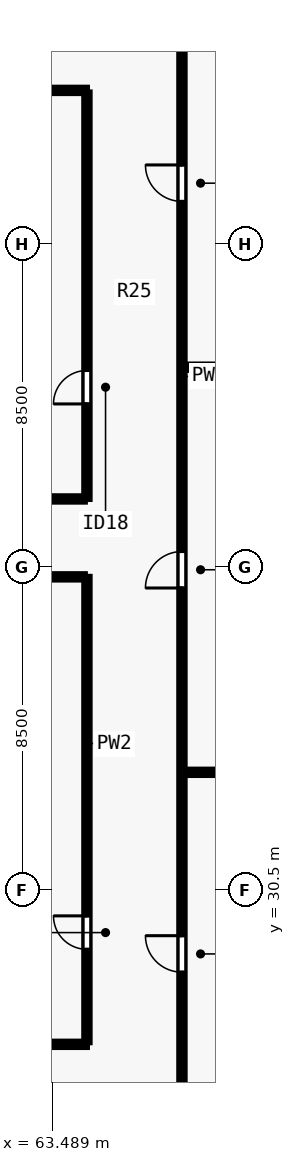
"""IFC4 building model, lengths in metres.
Left out: names, types, materials, properties, quantities, classifications, styles, units other than length and angle.
Written with IfcOpenShell. Run it as: python <this file> out.ifc"""

import sys

from ifc_helpers import new_model, si_unit, direction, frame, frame_2d, origin, place, context, subcontext, project, spatial, rectangle, extrude, element, fill, save


model = new_model("IFC4")
c1 = context("Model", 3, precision=1e-05, world=origin(), true_north=direction((0.0, 1.0)))
c2 = subcontext(c1, "Body", "Model", "MODEL_VIEW")
j1 = project(units=[si_unit("LENGTHUNIT", "METRE"), si_unit("PLANEANGLEUNIT", "RADIAN")], contexts=[c1])
p1 = place(None, origin())
s1 = spatial("IfcSite", under=j1, at=p1, CompositionType="ELEMENT")
p2 = place(p1, origin())
s2 = spatial("IfcBuilding", under=s1, at=p2, CompositionType="ELEMENT")
p3 = place(p2, frame((0.0, 0.0, 62.0)))
s3 = spatial("IfcBuildingStorey", under=s2, at=p3, CompositionType="ELEMENT", Elevation=62.0)
p4 = place(p3, frame((66.9, 24.005, 0.0), z_axis=(0.0, 0.0, 1.0), x_axis=(0.0, 1.0, 0.0)))
e1 = element("IfcWall", 1, at=p4, inside=s3, PredefinedType="PARTITIONING", context=c2, shape_type="SweptSolid", body=[
    extrude(rectangle(XDim=29.99, YDim=0.14, at=frame_2d((14.995, 0.0))), origin(), (0.0, 0.0, 1.0), 3.28),
])
p5 = place(p4, frame((4.344, 0.0, 0.0)))
e2 = element("IfcOpeningElement", 2, at=p5, cuts=e1, PredefinedType="OPENING", context=c2, shape_type="SweptSolid", body=[
    extrude(rectangle(XDim=0.96, YDim=2.12, at=frame_2d((0.48, 1.06))), frame((0.0, 0.08, 0.0), z_axis=(0.0, -1.0, 0.0), x_axis=(1.0, 0.0, 0.0)), (0.0, 0.0, 1.0), 0.16),
])
p6 = place(p4, frame((14.452, 0.0, 0.0)))
e3 = element("IfcOpeningElement", 3, at=p6, cuts=e1, PredefinedType="OPENING", context=c2, shape_type="SweptSolid", body=[
    extrude(rectangle(XDim=0.96, YDim=2.12, at=frame_2d((0.48, 1.06))), frame((0.0, 0.08, 0.0), z_axis=(0.0, -1.0, 0.0), x_axis=(1.0, 0.0, 0.0)), (0.0, 0.0, 1.0), 0.16),
])
p7 = place(p4, frame((24.623, 0.0, 0.0)))
e4 = element("IfcOpeningElement", 4, at=p7, cuts=e1, PredefinedType="OPENING", context=c2, shape_type="SweptSolid", body=[
    extrude(rectangle(XDim=0.96, YDim=2.12, at=frame_2d((0.48, 1.06))), frame((0.0, 0.08, 0.0), z_axis=(0.0, -1.0, 0.0), x_axis=(1.0, 0.0, 0.0)), (0.0, 0.0, 1.0), 0.16),
])
p8 = place(p3, frame((39.6, 26.45, 0.0), z_axis=(0.0, 0.0, 1.0), x_axis=(1.0, 0.0, 0.0)))
e5 = element("IfcWall", 5, at=p8, inside=s3, PredefinedType="PARTITIONING", context=c2, shape_type="SweptSolid", body=[
    extrude(rectangle(XDim=24.8, YDim=0.14, at=frame_2d((12.4, 0.0))), origin(), (0.0, 0.0, 1.0), 3.28),
])
p9 = place(p8, frame((2.2, 0.0, 0.0)))
e6 = element("IfcOpeningElement", 6, at=p9, cuts=e5, PredefinedType="OPENING", context=c2, shape_type="SweptSolid", body=[
    extrude(rectangle(XDim=0.96, YDim=2.12, at=frame_2d((0.48, 1.06))), frame((0.0, 0.08, 0.0), z_axis=(0.0, -1.0, 0.0), x_axis=(1.0, 0.0, 0.0)), (0.0, 0.0, 1.0), 0.16),
])
p10 = place(p8, frame((14.4, 0.0, 0.0)))
e7 = element("IfcOpeningElement", 7, at=p10, cuts=e5, PredefinedType="OPENING", context=c2, shape_type="SweptSolid", body=[
    extrude(rectangle(XDim=0.96, YDim=2.12, at=frame_2d((0.48, 1.06))), frame((0.0, 0.08, 0.0), z_axis=(0.0, -1.0, 0.0), x_axis=(1.0, 0.0, 0.0)), (0.0, 0.0, 1.0), 0.16),
])
p11 = place(p3, frame((39.6, 51.55, 0.0), z_axis=(0.0, 0.0, 1.0), x_axis=(1.0, 0.0, 0.0)))
e8 = element("IfcWall", 8, at=p11, inside=s3, PredefinedType="PARTITIONING", context=c2, shape_type="SweptSolid", body=[
    extrude(rectangle(XDim=24.8, YDim=0.14, at=frame_2d((12.4, 0.0))), origin(), (0.0, 0.0, 1.0), 3.28),
])
p12 = place(p11, frame((3.2, 0.0, 0.0)))
e9 = element("IfcOpeningElement", 9, at=p12, cuts=e8, PredefinedType="OPENING", context=c2, shape_type="SweptSolid", body=[
    extrude(rectangle(XDim=0.96, YDim=2.12, at=frame_2d((0.48, 1.06))), frame((0.0, 0.08, 0.0), z_axis=(0.0, -1.0, 0.0), x_axis=(1.0, 0.0, 0.0)), (0.0, 0.0, 1.0), 0.16),
])
p13 = place(p11, frame((18.4, 0.0, 0.0)))
e10 = element("IfcOpeningElement", 10, at=p13, cuts=e8, PredefinedType="OPENING", context=c2, shape_type="SweptSolid", body=[
    extrude(rectangle(XDim=0.96, YDim=2.12, at=frame_2d((0.48, 1.06))), frame((0.0, 0.08, 0.0), z_axis=(0.0, -1.0, 0.0), x_axis=(1.0, 0.0, 0.0)), (0.0, 0.0, 1.0), 0.16),
])
p14 = place(p3, frame((64.4, 26.505, 0.0), z_axis=(0.0, 0.0, 1.0), x_axis=(0.0, 1.0, 0.0)))
e11 = element("IfcWall", 11, at=p14, inside=s3, PredefinedType="PARTITIONING", context=c2, shape_type="SweptSolid", body=[
    extrude(rectangle(XDim=12.245, YDim=0.14, at=frame_2d((6.123, 0.0))), origin(), (0.0, 0.0, 1.0), 3.28),
])
p15 = place(p14, frame((2.445, 0.0, 0.0)))
e12 = element("IfcOpeningElement", 12, at=p15, cuts=e11, PredefinedType="OPENING", context=c2, shape_type="SweptSolid", body=[
    extrude(rectangle(XDim=0.88, YDim=2.1, at=frame_2d((0.44, 1.05))), frame((0.0, 0.08, 0.0), z_axis=(0.0, -1.0, 0.0), x_axis=(1.0, 0.0, 0.0)), (0.0, 0.0, 1.0), 0.16),
])
p16 = place(p3, frame((64.4, 40.8, 0.0), z_axis=(0.0, 0.0, 1.0), x_axis=(0.0, 1.0, 0.0)))
e13 = element("IfcWall", 13, at=p16, inside=s3, PredefinedType="PARTITIONING", context=c2, shape_type="SweptSolid", body=[
    extrude(rectangle(XDim=10.695, YDim=0.14, at=frame_2d((5.348, 0.0))), origin(), (0.0, 0.0, 1.0), 3.28),
])
p17 = place(p16, frame((2.5, 0.0, 0.0)))
e14 = element("IfcOpeningElement", 14, at=p17, cuts=e13, PredefinedType="OPENING", context=c2, shape_type="SweptSolid", body=[
    extrude(rectangle(XDim=0.88, YDim=2.1, at=frame_2d((0.44, 1.05))), frame((0.0, 0.08, 0.0), z_axis=(0.0, -1.0, 0.0), x_axis=(1.0, 0.0, 0.0)), (0.0, 0.0, 1.0), 0.16),
])
for number, where, z_axis, x_axis in (
    (15, (60.76, 38.75, 0.0), (0.0, 0.0, 1.0), (1.0, 0.0, 0.0)),
    (16, (60.76, 40.8, 0.0), (0.0, 0.0, 1.0), (1.0, 0.0, 0.0)),
):
    element("IfcWall", number, at=place(p3, frame(where, z_axis=z_axis, x_axis=x_axis)), inside=s3, PredefinedType="PARTITIONING", context=c2, shape_type="SweptSolid", body=[
        extrude(rectangle(XDim=3.585, YDim=0.14, at=frame_2d((1.792, 0.0))), origin(), (0.0, 0.0, 1.0), 3.28),
    ])
p18 = place(p3, frame((67.0, 33.607, 0.0), z_axis=(0.0, 0.0, 1.0), x_axis=(1.0, 0.0, 0.0)))
e17 = element("IfcWall", 17, at=p18, inside=s3, PredefinedType="PARTITIONING", context=c2, shape_type="SweptSolid", body=[
    extrude(rectangle(XDim=8.1, YDim=0.14, at=frame_2d((4.05, 0.0))), origin(), (0.0, 0.0, 1.0), 2.439),
])
p19 = place(p3, frame((67.0, 44.267, 0.0), z_axis=(0.0, 0.0, 1.0), x_axis=(1.0, 0.0, 0.0)))
e18 = element("IfcWall", 18, at=p19, inside=s3, PredefinedType="PARTITIONING", context=c2, shape_type="SweptSolid", body=[
    extrude(rectangle(XDim=10.08, YDim=0.14, at=frame_2d((5.04, 0.0))), origin(), (0.0, 0.0, 1.0), 2.439),
])
p20 = place(p15, origin())
e19 = element("IfcDoor", 19, at=p20, inside=s3, OperationType="SINGLE_SWING_RIGHT", PredefinedType="DOOR", context=c2, shape_type="SweptSolid", body=[
    extrude(rectangle(XDim=0.88, YDim=2.1, at=frame_2d((0.44, 1.05))), frame((0.0, 0.025, 0.0), z_axis=(0.0, -1.0, 0.0), x_axis=(1.0, 0.0, 0.0)), (0.0, 0.0, 1.0), 0.05),
])
fill(e12, e19)
p21 = place(p17, origin())
e20 = element("IfcDoor", 20, at=p21, inside=s3, OperationType="SINGLE_SWING_LEFT", PredefinedType="DOOR", context=c2, shape_type="SweptSolid", body=[
    extrude(rectangle(XDim=0.88, YDim=2.1, at=frame_2d((0.44, 1.05))), frame((0.0, 0.025, 0.0), z_axis=(0.0, -1.0, 0.0), x_axis=(1.0, 0.0, 0.0)), (0.0, 0.0, 1.0), 0.05),
])
fill(e14, e20)
p22 = place(p5, origin())
e21 = element("IfcDoor", 21, at=p22, inside=s3, OperationType="SINGLE_SWING_RIGHT", PredefinedType="DOOR", context=c2, shape_type="SweptSolid", body=[
    extrude(rectangle(XDim=0.96, YDim=2.12, at=frame_2d((0.48, 1.06))), frame((0.0, 0.025, 0.0), z_axis=(0.0, -1.0, 0.0), x_axis=(1.0, 0.0, 0.0)), (0.0, 0.0, 1.0), 0.05),
])
fill(e2, e21)
p23 = place(p6, origin())
e22 = element("IfcDoor", 22, at=p23, inside=s3, OperationType="SINGLE_SWING_LEFT", PredefinedType="DOOR", context=c2, shape_type="SweptSolid", body=[
    extrude(rectangle(XDim=0.96, YDim=2.12, at=frame_2d((0.48, 1.06))), frame((0.0, 0.025, 0.0), z_axis=(0.0, -1.0, 0.0), x_axis=(1.0, 0.0, 0.0)), (0.0, 0.0, 1.0), 0.05),
])
fill(e3, e22)
p24 = place(p7, origin())
e23 = element("IfcDoor", 23, at=p24, inside=s3, OperationType="SINGLE_SWING_RIGHT", PredefinedType="DOOR", context=c2, shape_type="SweptSolid", body=[
    extrude(rectangle(XDim=0.96, YDim=2.12, at=frame_2d((0.48, 1.06))), frame((0.0, 0.025, 0.0), z_axis=(0.0, -1.0, 0.0), x_axis=(1.0, 0.0, 0.0)), (0.0, 0.0, 1.0), 0.05),
])
fill(e4, e23)
save(model, sys.argv[1])
